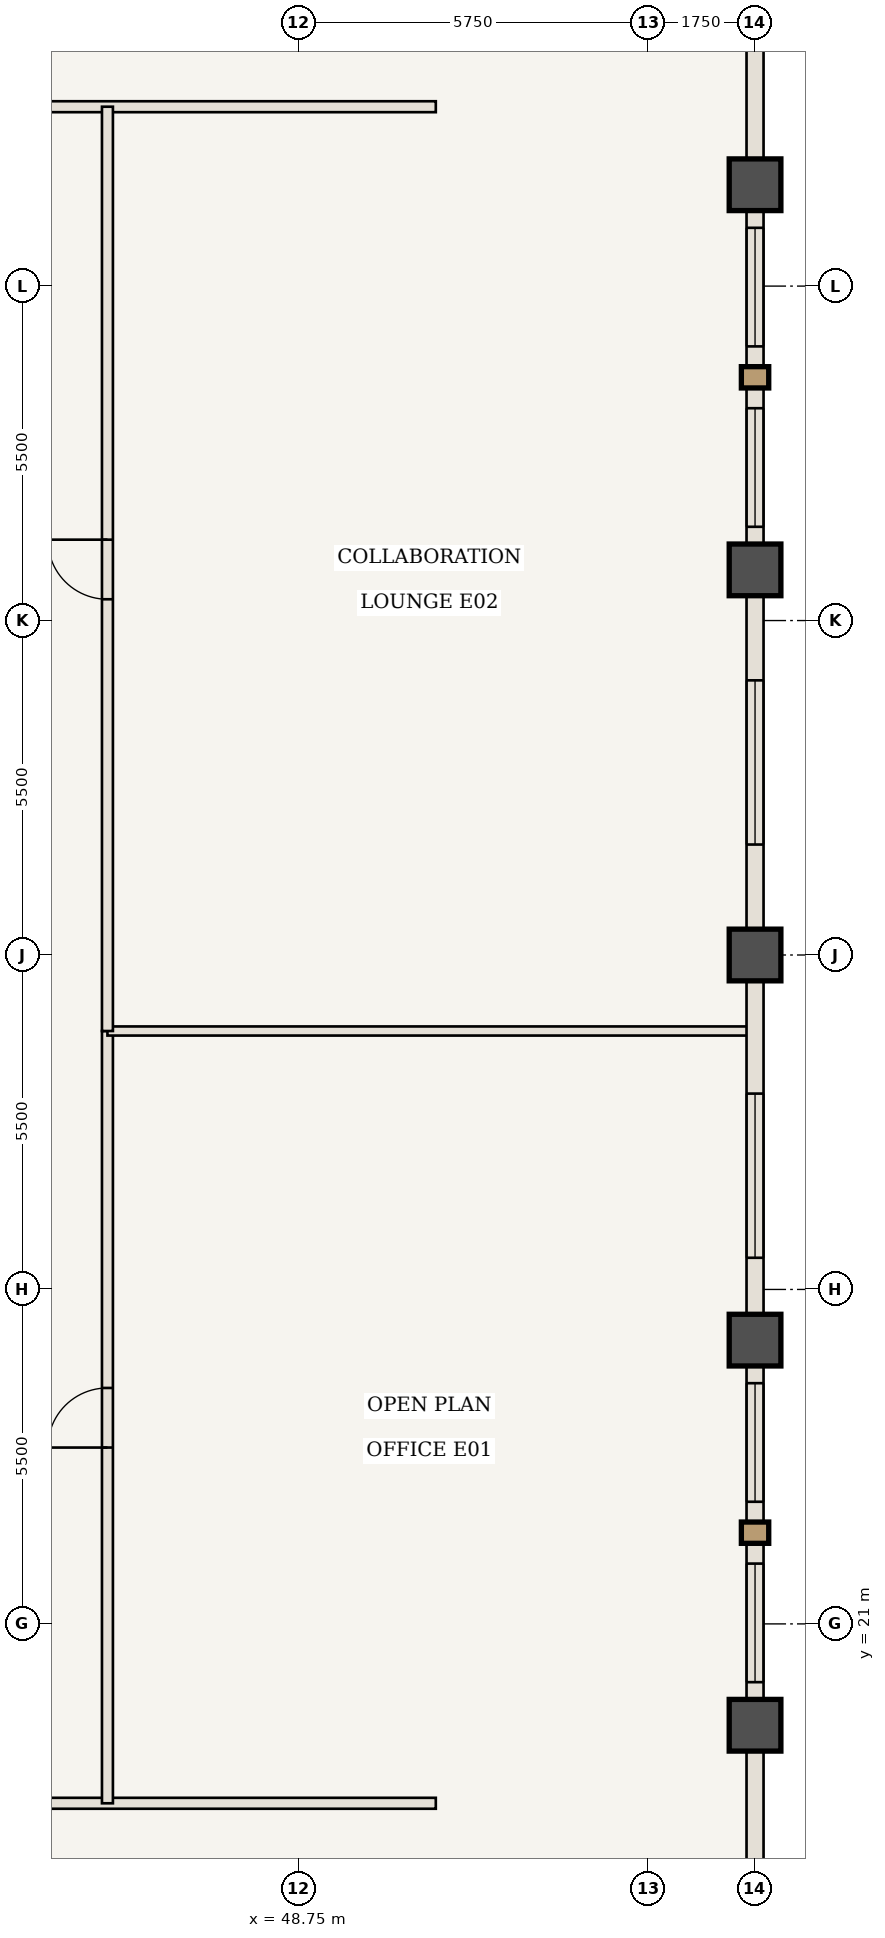
"""IFC4 building model, lengths in metres.
Left out: names, types, materials, properties, quantities, classifications, styles, units other than length and angle.
Written with IfcOpenShell. Run it as: python <this file> out.ifc"""

import sys

from ifc_helpers import new_model, si_unit, direction, frame, frame_2d, origin, origin_2d, place, context, subcontext, project, spatial, rectangle, extrude, element, fill, save


model = new_model("IFC4")
c1 = context("Model", 3, precision=1e-05, world=origin(), true_north=direction((0.0, 1.0)))
c2 = subcontext(c1, "Body", "Model", "MODEL_VIEW")
j1 = project(units=[si_unit("LENGTHUNIT", "METRE"), si_unit("PLANEANGLEUNIT", "RADIAN")], contexts=[c1])
p1 = place(None, origin())
s1 = spatial("IfcSite", under=j1, at=p1, CompositionType="ELEMENT")
p2 = place(p1, origin())
s2 = spatial("IfcBuilding", under=s1, at=p2, CompositionType="ELEMENT")
p3 = place(p2, frame((0.0, 0.0, 202.3)))
s3 = spatial("IfcBuildingStorey", under=s2, at=p3, CompositionType="ELEMENT", Elevation=202.3)
for number, where, z_axis, x_axis in (
    (1, (56.25, 19.333, 0.0), (0.0, 0.0, 1.0), (1.0, 0.0, 0.0)),
    (2, (56.25, 25.667, 0.0), (0.0, 0.0, 1.0), (1.0, 0.0, 0.0)),
    (3, (56.25, 32.0, 0.0), (0.0, 0.0, 1.0), (1.0, 0.0, 0.0)),
    (4, (56.25, 38.333, 0.0), (0.0, 0.0, 1.0), (1.0, 0.0, 0.0)),
    (5, (56.25, 44.667, 0.0), (0.0, 0.0, 1.0), (1.0, 0.0, 0.0)),
):
    element("IfcColumn", number, at=place(p3, frame(where, z_axis=z_axis, x_axis=x_axis)), inside=s3, PredefinedType="COLUMN", context=c2, shape_type="SweptSolid", body=[
        extrude(rectangle(XDim=0.85, YDim=0.85, at=origin_2d()), origin(), (0.0, 0.0, 1.0), 3.85),
    ])
p4 = place(p3, frame((39.208, 18.05, 0.0), z_axis=(0.0, 0.0, 1.0), x_axis=(1.0, 0.0, 0.0)))
e6 = element("IfcWall", 6, at=p4, inside=s3, PredefinedType="STANDARD", context=c2, shape_type="SweptSolid", body=[
    extrude(rectangle(XDim=11.792, YDim=0.18, at=frame_2d((5.896, 0.0))), origin(), (0.0, 0.0, 1.0), 3.685),
])
p5 = place(p4, frame((1.221, 0.0, 0.0)))
e7 = element("IfcOpeningElement", 7, at=p5, cuts=e6, PredefinedType="OPENING", context=c2, shape_type="SweptSolid", body=[
    extrude(rectangle(XDim=0.98, YDim=2.2, at=frame_2d((0.49, 1.1))), frame((0.0, 0.1, 0.0), z_axis=(0.0, -1.0, 0.0), x_axis=(1.0, 0.0, 0.0)), (0.0, 0.0, 1.0), 0.2),
])
p6 = place(p3, frame((39.558, 45.95, 0.0), z_axis=(0.0, 0.0, 1.0), x_axis=(1.0, 0.0, 0.0)))
e8 = element("IfcWall", 8, at=p6, inside=s3, PredefinedType="STANDARD", context=c2, shape_type="SweptSolid", body=[
    extrude(rectangle(XDim=11.442, YDim=0.18, at=frame_2d((5.721, 0.0))), origin(), (0.0, 0.0, 1.0), 3.685),
])
p7 = place(p6, frame((1.046, 0.0, 0.0)))
e9 = element("IfcOpeningElement", 9, at=p7, cuts=e8, PredefinedType="OPENING", context=c2, shape_type="SweptSolid", body=[
    extrude(rectangle(XDim=0.98, YDim=2.2, at=frame_2d((0.49, 1.1))), frame((0.0, 0.1, 0.0), z_axis=(0.0, -1.0, 0.0), x_axis=(1.0, 0.0, 0.0)), (0.0, 0.0, 1.0), 0.2),
])
p8 = place(p3, frame((45.6, 18.05, 0.0), z_axis=(0.0, 0.0, 1.0), x_axis=(0.0, 1.0, 0.0)))
e10 = element("IfcWall", 10, at=p8, inside=s3, PredefinedType="STANDARD", context=c2, shape_type="SweptSolid", body=[
    extrude(rectangle(XDim=12.7, YDim=0.18, at=frame_2d((6.35, 0.0))), origin(), (0.0, 0.0, 1.0), 3.685),
])
p9 = place(p8, frame((5.85, 0.0, 0.0)))
e11 = element("IfcOpeningElement", 11, at=p9, cuts=e10, PredefinedType="OPENING", context=c2, shape_type="SweptSolid", body=[
    extrude(rectangle(XDim=0.98, YDim=2.2, at=frame_2d((0.49, 1.1))), frame((0.0, 0.1, 0.0), z_axis=(0.0, -1.0, 0.0), x_axis=(1.0, 0.0, 0.0)), (0.0, 0.0, 1.0), 0.2),
])
p10 = place(p3, frame((45.6, 30.75, 0.0), z_axis=(0.0, 0.0, 1.0), x_axis=(1.0, 0.0, 0.0)))
e12 = element("IfcWall", 12, at=p10, inside=s3, PredefinedType="STANDARD", context=c2, shape_type="SweptSolid", body=[
    extrude(rectangle(XDim=10.59, YDim=0.15, at=frame_2d((5.295, 0.0))), origin(), (0.0, 0.0, 1.0), 3.685),
])
p11 = place(p3, frame((45.6, 30.75, 0.0), z_axis=(0.0, 0.0, 1.0), x_axis=(0.0, 1.0, 0.0)))
e13 = element("IfcWall", 13, at=p11, inside=s3, PredefinedType="STANDARD", context=c2, shape_type="SweptSolid", body=[
    extrude(rectangle(XDim=15.2, YDim=0.18, at=frame_2d((7.6, 0.0))), origin(), (0.0, 0.0, 1.0), 3.685),
])
p12 = place(p11, frame((7.1, 0.0, 0.0)))
e14 = element("IfcOpeningElement", 14, at=p12, cuts=e13, PredefinedType="OPENING", context=c2, shape_type="SweptSolid", body=[
    extrude(rectangle(XDim=0.98, YDim=2.2, at=frame_2d((0.49, 1.1))), frame((0.0, 0.1, 0.0), z_axis=(0.0, -1.0, 0.0), x_axis=(1.0, 0.0, 0.0)), (0.0, 0.0, 1.0), 0.2),
])
p13 = place(p3, frame((56.25, 19.333, 0.0), z_axis=(0.0, 0.0, 1.0), x_axis=(0.0, -1.0, 0.0)))
e15 = element("IfcWall", 15, at=p13, inside=s3, PredefinedType="USERDEFINED", context=c2, shape_type="SweptSolid", body=[
    extrude(rectangle(XDim=6.333, YDim=0.28, at=frame_2d((3.167, 0.0))), origin(), (0.0, 0.0, 1.0), 2.985),
])
p14 = place(p3, frame((56.25, 25.667, 0.0), z_axis=(0.0, 0.0, 1.0), x_axis=(0.0, -1.0, 0.0)))
e16 = element("IfcWall", 16, at=p14, inside=s3, PredefinedType="USERDEFINED", context=c2, shape_type="SweptSolid", body=[
    extrude(rectangle(XDim=6.333, YDim=0.28, at=frame_2d((3.167, 0.0))), origin(), (0.0, 0.0, 1.0), 2.985),
])
p15 = place(p14, frame((0.708, 0.0, 0.85)))
e17 = element("IfcOpeningElement", 17, at=p15, cuts=e16, PredefinedType="OPENING", context=c2, shape_type="SweptSolid", body=[
    extrude(rectangle(XDim=1.95, YDim=1.935, at=frame_2d((0.975, 0.968))), frame((0.0, 0.15, 0.0), z_axis=(0.0, -1.0, 0.0), x_axis=(1.0, 0.0, 0.0)), (0.0, 0.0, 1.0), 0.3),
])
p16 = place(p14, frame((3.675, 0.0, 0.85)))
e18 = element("IfcOpeningElement", 18, at=p16, cuts=e16, PredefinedType="OPENING", context=c2, shape_type="SweptSolid", body=[
    extrude(rectangle(XDim=1.95, YDim=1.935, at=frame_2d((0.975, 0.968))), frame((0.0, 0.15, 0.0), z_axis=(0.0, -1.0, 0.0), x_axis=(1.0, 0.0, 0.0)), (0.0, 0.0, 1.0), 0.3),
])
p17 = place(p3, frame((56.25, 32.0, 0.0), z_axis=(0.0, 0.0, 1.0), x_axis=(0.0, -1.0, 0.0)))
e19 = element("IfcWall", 19, at=p17, inside=s3, PredefinedType="USERDEFINED", context=c2, shape_type="SweptSolid", body=[
    extrude(rectangle(XDim=6.333, YDim=0.28, at=frame_2d((3.167, 0.0))), origin(), (0.0, 0.0, 1.0), 2.985),
])
p18 = place(p17, frame((2.279, 0.0, 0.85)))
e20 = element("IfcOpeningElement", 20, at=p18, cuts=e19, PredefinedType="OPENING", context=c2, shape_type="SweptSolid", body=[
    extrude(rectangle(XDim=2.7, YDim=1.935, at=frame_2d((1.35, 0.968))), frame((0.0, 0.15, 0.0), z_axis=(0.0, -1.0, 0.0), x_axis=(1.0, 0.0, 0.0)), (0.0, 0.0, 1.0), 0.3),
])
p19 = place(p3, frame((56.25, 38.333, 0.0), z_axis=(0.0, 0.0, 1.0), x_axis=(0.0, -1.0, 0.0)))
e21 = element("IfcWall", 21, at=p19, inside=s3, PredefinedType="USERDEFINED", context=c2, shape_type="SweptSolid", body=[
    extrude(rectangle(XDim=6.333, YDim=0.28, at=frame_2d((3.167, 0.0))), origin(), (0.0, 0.0, 1.0), 2.985),
])
p20 = place(p19, frame((1.817, 0.0, 0.85)))
e22 = element("IfcOpeningElement", 22, at=p20, cuts=e21, PredefinedType="OPENING", context=c2, shape_type="SweptSolid", body=[
    extrude(rectangle(XDim=2.7, YDim=1.935, at=frame_2d((1.35, 0.968))), frame((0.0, 0.15, 0.0), z_axis=(0.0, -1.0, 0.0), x_axis=(1.0, 0.0, 0.0)), (0.0, 0.0, 1.0), 0.3),
])
p21 = place(p3, frame((56.25, 44.667, 0.0), z_axis=(0.0, 0.0, 1.0), x_axis=(0.0, -1.0, 0.0)))
e23 = element("IfcWall", 23, at=p21, inside=s3, PredefinedType="USERDEFINED", context=c2, shape_type="SweptSolid", body=[
    extrude(rectangle(XDim=6.333, YDim=0.28, at=frame_2d((3.167, 0.0))), origin(), (0.0, 0.0, 1.0), 2.985),
])
p22 = place(p21, frame((0.708, 0.0, 0.85)))
e24 = element("IfcOpeningElement", 24, at=p22, cuts=e23, PredefinedType="OPENING", context=c2, shape_type="SweptSolid", body=[
    extrude(rectangle(XDim=1.95, YDim=1.935, at=frame_2d((0.975, 0.968))), frame((0.0, 0.15, 0.0), z_axis=(0.0, -1.0, 0.0), x_axis=(1.0, 0.0, 0.0)), (0.0, 0.0, 1.0), 0.3),
])
p23 = place(p21, frame((3.675, 0.0, 0.85)))
e25 = element("IfcOpeningElement", 25, at=p23, cuts=e23, PredefinedType="OPENING", context=c2, shape_type="SweptSolid", body=[
    extrude(rectangle(XDim=1.95, YDim=1.935, at=frame_2d((0.975, 0.968))), frame((0.0, 0.15, 0.0), z_axis=(0.0, -1.0, 0.0), x_axis=(1.0, 0.0, 0.0)), (0.0, 0.0, 1.0), 0.3),
])
p24 = place(p3, frame((56.25, 51.0, 0.0), z_axis=(0.0, 0.0, 1.0), x_axis=(0.0, -1.0, 0.0)))
e26 = element("IfcWall", 26, at=p24, inside=s3, PredefinedType="USERDEFINED", context=c2, shape_type="SweptSolid", body=[
    extrude(rectangle(XDim=6.333, YDim=0.28, at=frame_2d((3.167, 0.0))), origin(), (0.0, 0.0, 1.0), 2.985),
])
p25 = place(p9, origin())
e27 = element("IfcDoor", 27, at=p25, inside=s3, OperationType="SINGLE_SWING_LEFT", PredefinedType="DOOR", context=c2, shape_type="SweptSolid", body=[
    extrude(rectangle(XDim=0.98, YDim=2.2, at=frame_2d((0.49, 1.1))), frame((0.0, 0.025, 0.0), z_axis=(0.0, -1.0, 0.0), x_axis=(1.0, 0.0, 0.0)), (0.0, 0.0, 1.0), 0.05),
])
fill(e11, e27)
p26 = place(p12, origin())
e28 = element("IfcDoor", 28, at=p26, inside=s3, OperationType="SINGLE_SWING_RIGHT", PredefinedType="DOOR", context=c2, shape_type="SweptSolid", body=[
    extrude(rectangle(XDim=0.98, YDim=2.2, at=frame_2d((0.49, 1.1))), frame((0.0, 0.025, 0.0), z_axis=(0.0, -1.0, 0.0), x_axis=(1.0, 0.0, 0.0)), (0.0, 0.0, 1.0), 0.05),
])
fill(e14, e28)
p27 = place(p15, origin())
e29 = element("IfcWindow", 29, at=p27, inside=s3, PartitioningType="SINGLE_PANEL", PredefinedType="WINDOW", context=c2, shape_type="SweptSolid", body=[
    extrude(rectangle(XDim=1.95, YDim=1.935, at=frame_2d((0.975, 0.968))), frame((0.0, 0.03, 0.0), z_axis=(0.0, -1.0, 0.0), x_axis=(1.0, 0.0, 0.0)), (0.0, 0.0, 1.0), 0.06),
])
fill(e17, e29)
p28 = place(p16, origin())
e30 = element("IfcWindow", 30, at=p28, inside=s3, PartitioningType="SINGLE_PANEL", PredefinedType="WINDOW", context=c2, shape_type="SweptSolid", body=[
    extrude(rectangle(XDim=1.95, YDim=1.935, at=frame_2d((0.975, 0.968))), frame((0.0, 0.03, 0.0), z_axis=(0.0, -1.0, 0.0), x_axis=(1.0, 0.0, 0.0)), (0.0, 0.0, 1.0), 0.06),
])
fill(e18, e30)
p29 = place(p18, origin())
e31 = element("IfcWindow", 31, at=p29, inside=s3, PartitioningType="SINGLE_PANEL", PredefinedType="WINDOW", context=c2, shape_type="SweptSolid", body=[
    extrude(rectangle(XDim=2.7, YDim=1.935, at=frame_2d((1.35, 0.968))), frame((0.0, 0.03, 0.0), z_axis=(0.0, -1.0, 0.0), x_axis=(1.0, 0.0, 0.0)), (0.0, 0.0, 1.0), 0.06),
])
fill(e20, e31)
p30 = place(p20, origin())
e32 = element("IfcWindow", 32, at=p30, inside=s3, PartitioningType="SINGLE_PANEL", PredefinedType="WINDOW", context=c2, shape_type="SweptSolid", body=[
    extrude(rectangle(XDim=2.7, YDim=1.935, at=frame_2d((1.35, 0.968))), frame((0.0, 0.03, 0.0), z_axis=(0.0, -1.0, 0.0), x_axis=(1.0, 0.0, 0.0)), (0.0, 0.0, 1.0), 0.06),
])
fill(e22, e32)
p31 = place(p22, origin())
e33 = element("IfcWindow", 33, at=p31, inside=s3, PartitioningType="SINGLE_PANEL", PredefinedType="WINDOW", context=c2, shape_type="SweptSolid", body=[
    extrude(rectangle(XDim=1.95, YDim=1.935, at=frame_2d((0.975, 0.968))), frame((0.0, 0.03, 0.0), z_axis=(0.0, -1.0, 0.0), x_axis=(1.0, 0.0, 0.0)), (0.0, 0.0, 1.0), 0.06),
])
fill(e24, e33)
p32 = place(p23, origin())
e34 = element("IfcWindow", 34, at=p32, inside=s3, PartitioningType="SINGLE_PANEL", PredefinedType="WINDOW", context=c2, shape_type="SweptSolid", body=[
    extrude(rectangle(XDim=1.95, YDim=1.935, at=frame_2d((0.975, 0.968))), frame((0.0, 0.03, 0.0), z_axis=(0.0, -1.0, 0.0), x_axis=(1.0, 0.0, 0.0)), (0.0, 0.0, 1.0), 0.06),
])
fill(e25, e34)
save(model, sys.argv[1])
